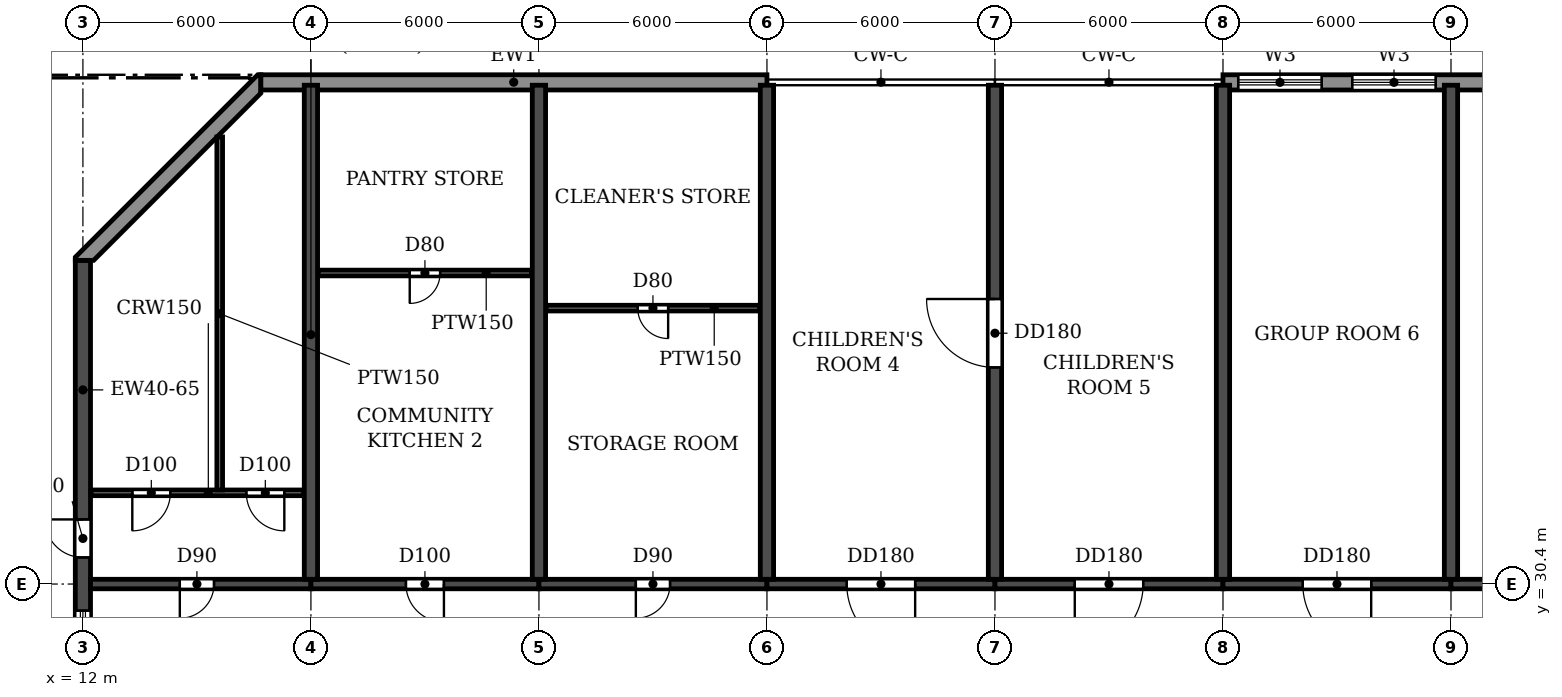
"""IFC4 building model, lengths in metres.
Left out: names, types, materials, properties, quantities, classifications, styles, units other than length and angle.
Written with IfcOpenShell. Run it as: python <this file> out.ifc"""

import sys

from ifc_helpers import new_model, si_unit, direction, frame, frame_2d, origin, place, context, subcontext, project, spatial, polyline, rectangle, outline, extrude, element, fill, save


model = new_model("IFC4")
c1 = context("Model", 3, precision=1e-05, world=origin(), true_north=direction((0.0, 1.0)))
c2 = subcontext(c1, "Body", "Model", "MODEL_VIEW")
j1 = project(units=[si_unit("LENGTHUNIT", "METRE"), si_unit("PLANEANGLEUNIT", "RADIAN")], contexts=[c1])
p1 = place(None, origin())
s1 = spatial("IfcSite", under=j1, at=p1, CompositionType="ELEMENT")
p2 = place(p1, origin())
s2 = spatial("IfcBuilding", under=s1, at=p2, CompositionType="ELEMENT")
p3 = place(p2, frame((0.0, 0.0, 105.9)))
s3 = spatial("IfcBuildingStorey", under=s2, at=p3, CompositionType="ELEMENT", Elevation=105.9)
for number, where, z_axis, x_axis in (
    (1, (18.0, 30.525, 0.0), (0.0, 0.0, 1.0), (0.0, 1.0, 0.0)),
    (2, (24.0, 30.525, 0.0), (0.0, 0.0, 1.0), (0.0, 1.0, 0.0)),
    (3, (30.0, 30.525, 0.0), (0.0, 0.0, 1.0), (0.0, 1.0, 0.0)),
):
    element("IfcWall", number, at=place(p3, frame(where, z_axis=z_axis, x_axis=x_axis)), inside=s3, PredefinedType="SHEAR", context=c2, shape_type="SweptSolid", body=[
        extrude(rectangle(XDim=13.0, YDim=0.35, at=frame_2d((6.5, 0.0))), origin(), (0.0, 0.0, 1.0), 3.06),
    ])
p4 = place(p3, frame((36.0, 30.525, 0.0), z_axis=(0.0, 0.0, 1.0), x_axis=(0.0, 1.0, 0.0)))
e4 = element("IfcWall", 4, at=p4, inside=s3, PredefinedType="SHEAR", context=c2, shape_type="SweptSolid", body=[
    extrude(rectangle(XDim=13.0, YDim=0.35, at=frame_2d((6.5, 0.0))), origin(), (0.0, 0.0, 1.0), 3.06),
])
p5 = place(p4, frame((5.575, 0.0, 0.0)))
e5 = element("IfcOpeningElement", 5, at=p5, cuts=e4, PredefinedType="OPENING", context=c2, shape_type="SweptSolid", body=[
    extrude(rectangle(XDim=1.8, YDim=2.1, at=frame_2d((0.9, 1.05))), frame((0.0, 0.185, 0.0), z_axis=(0.0, -1.0, 0.0), x_axis=(1.0, 0.0, 0.0)), (0.0, 0.0, 1.0), 0.37),
])
for number, where, z_axis, x_axis in (
    (6, (42.0, 30.525, 0.0), (0.0, 0.0, 1.0), (0.0, 1.0, 0.0)),
    (7, (48.0, 30.525, 0.0), (0.0, 0.0, 1.0), (0.0, 1.0, 0.0)),
):
    element("IfcWall", number, at=place(p3, frame(where, z_axis=z_axis, x_axis=x_axis)), inside=s3, PredefinedType="SHEAR", context=c2, shape_type="SweptSolid", body=[
        extrude(rectangle(XDim=13.0, YDim=0.35, at=frame_2d((6.5, 0.0))), origin(), (0.0, 0.0, 1.0), 3.06),
    ])
p6 = place(p3, frame((12.0, 4.683, 0.0), z_axis=(0.0, 0.0, 1.0), x_axis=(0.0, 1.0, 0.0)))
e8 = element("IfcWall", 8, at=p6, inside=s3, PredefinedType="SHEAR", context=c2, shape_type="SweptSolid", body=[
    extrude(rectangle(XDim=34.234, YDim=0.4, at=frame_2d((17.117, 0.0))), origin(), (0.0, 0.0, 1.0), 3.06),
])
p7 = place(p6, frame((23.817, 0.0, 0.9)))
e9 = element("IfcOpeningElement", 9, at=p7, cuts=e8, PredefinedType="OPENING", context=c2, shape_type="SweptSolid", body=[
    extrude(rectangle(XDim=1.2, YDim=1.5, at=frame_2d((0.6, 0.75))), frame((0.0, 0.21, 0.0), z_axis=(0.0, -1.0, 0.0), x_axis=(1.0, 0.0, 0.0)), (0.0, 0.0, 1.0), 0.42),
])
p8 = place(p6, frame((8.017, 0.0, 0.9)))
e10 = element("IfcOpeningElement", 10, at=p8, cuts=e8, PredefinedType="OPENING", context=c2, shape_type="SweptSolid", body=[
    extrude(rectangle(XDim=1.2, YDim=1.5, at=frame_2d((0.6, 0.75))), frame((0.0, 0.21, 0.0), z_axis=(0.0, -1.0, 0.0), x_axis=(1.0, 0.0, 0.0)), (0.0, 0.0, 1.0), 0.42),
])
p9 = place(p6, frame((15.917, 0.0, 0.9)))
e11 = element("IfcOpeningElement", 11, at=p9, cuts=e8, PredefinedType="OPENING", context=c2, shape_type="SweptSolid", body=[
    extrude(rectangle(XDim=1.2, YDim=1.5, at=frame_2d((0.6, 0.75))), frame((0.0, 0.21, 0.0), z_axis=(0.0, -1.0, 0.0), x_axis=(1.0, 0.0, 0.0)), (0.0, 0.0, 1.0), 0.42),
])
p10 = place(p6, frame((26.417, 0.0, 0.0)))
e12 = element("IfcOpeningElement", 12, at=p10, cuts=e8, PredefinedType="OPENING", context=c2, shape_type="SweptSolid", body=[
    extrude(rectangle(XDim=1.0, YDim=2.1, at=frame_2d((0.5, 1.05))), frame((0.0, 0.21, 0.0), z_axis=(0.0, -1.0, 0.0), x_axis=(1.0, 0.0, 0.0)), (0.0, 0.0, 1.0), 0.42),
])
p11 = place(p6, frame((3.159, 0.0, 0.0)))
e13 = element("IfcOpeningElement", 13, at=p11, cuts=e8, PredefinedType="OPENING", context=c2, shape_type="SweptSolid", body=[
    extrude(rectangle(XDim=1.0, YDim=2.1, at=frame_2d((0.5, 1.05))), frame((0.0, 0.21, 0.0), z_axis=(0.0, -1.0, 0.0), x_axis=(1.0, 0.0, 0.0)), (0.0, 0.0, 1.0), 0.42),
])
p12 = place(p3, frame((12.2, 30.4, 0.0), z_axis=(0.0, 0.0, 1.0), x_axis=(1.0, 0.0, 0.0)))
e14 = element("IfcWall", 14, at=p12, inside=s3, PredefinedType="SHEAR", context=c2, shape_type="SweptSolid", body=[
    extrude(rectangle(XDim=5.8, YDim=0.25, at=frame_2d((2.9, 0.0))), origin(), (0.0, 0.0, 1.0), 2.46),
])
p13 = place(p12, frame((2.35, 0.0, 0.0)))
e15 = element("IfcOpeningElement", 15, at=p13, cuts=e14, PredefinedType="OPENING", context=c2, shape_type="SweptSolid", body=[
    extrude(rectangle(XDim=0.9, YDim=2.1, at=frame_2d((0.45, 1.05))), frame((0.0, 0.135, 0.0), z_axis=(0.0, -1.0, 0.0), x_axis=(1.0, 0.0, 0.0)), (0.0, 0.0, 1.0), 0.27),
])
p14 = place(p3, frame((18.0, 30.4, 0.0), z_axis=(0.0, 0.0, 1.0), x_axis=(1.0, 0.0, 0.0)))
e16 = element("IfcWall", 16, at=p14, inside=s3, PredefinedType="SHEAR", context=c2, shape_type="SweptSolid", body=[
    extrude(rectangle(XDim=6.0, YDim=0.25, at=frame_2d((3.0, 0.0))), origin(), (0.0, 0.0, 1.0), 2.46),
])
p15 = place(p14, frame((2.5, 0.0, 0.0)))
e17 = element("IfcOpeningElement", 17, at=p15, cuts=e16, PredefinedType="OPENING", context=c2, shape_type="SweptSolid", body=[
    extrude(rectangle(XDim=1.0, YDim=2.1, at=frame_2d((0.5, 1.05))), frame((0.0, 0.135, 0.0), z_axis=(0.0, -1.0, 0.0), x_axis=(1.0, 0.0, 0.0)), (0.0, 0.0, 1.0), 0.27),
])
p16 = place(p3, frame((24.0, 30.4, 0.0), z_axis=(0.0, 0.0, 1.0), x_axis=(1.0, 0.0, 0.0)))
e18 = element("IfcWall", 18, at=p16, inside=s3, PredefinedType="SHEAR", context=c2, shape_type="SweptSolid", body=[
    extrude(rectangle(XDim=6.0, YDim=0.25, at=frame_2d((3.0, 0.0))), origin(), (0.0, 0.0, 1.0), 2.46),
])
p17 = place(p16, frame((2.55, 0.0, 0.0)))
e19 = element("IfcOpeningElement", 19, at=p17, cuts=e18, PredefinedType="OPENING", context=c2, shape_type="SweptSolid", body=[
    extrude(rectangle(XDim=0.9, YDim=2.1, at=frame_2d((0.45, 1.05))), frame((0.0, 0.135, 0.0), z_axis=(0.0, -1.0, 0.0), x_axis=(1.0, 0.0, 0.0)), (0.0, 0.0, 1.0), 0.27),
])
p18 = place(p3, frame((30.0, 30.4, 0.0), z_axis=(0.0, 0.0, 1.0), x_axis=(1.0, 0.0, 0.0)))
e20 = element("IfcWall", 20, at=p18, inside=s3, PredefinedType="SHEAR", context=c2, shape_type="SweptSolid", body=[
    extrude(rectangle(XDim=6.0, YDim=0.25, at=frame_2d((3.0, 0.0))), origin(), (0.0, 0.0, 1.0), 2.46),
])
p19 = place(p18, frame((2.1, 0.0, 0.0)))
e21 = element("IfcOpeningElement", 21, at=p19, cuts=e20, PredefinedType="OPENING", context=c2, shape_type="SweptSolid", body=[
    extrude(rectangle(XDim=1.8, YDim=2.1, at=frame_2d((0.9, 1.05))), frame((0.0, 0.135, 0.0), z_axis=(0.0, -1.0, 0.0), x_axis=(1.0, 0.0, 0.0)), (0.0, 0.0, 1.0), 0.27),
])
p20 = place(p3, frame((36.0, 30.4, 0.0), z_axis=(0.0, 0.0, 1.0), x_axis=(1.0, 0.0, 0.0)))
e22 = element("IfcWall", 22, at=p20, inside=s3, PredefinedType="SHEAR", context=c2, shape_type="SweptSolid", body=[
    extrude(rectangle(XDim=6.0, YDim=0.25, at=frame_2d((3.0, 0.0))), origin(), (0.0, 0.0, 1.0), 2.46),
])
p21 = place(p20, frame((2.1, 0.0, 0.0)))
e23 = element("IfcOpeningElement", 23, at=p21, cuts=e22, PredefinedType="OPENING", context=c2, shape_type="SweptSolid", body=[
    extrude(rectangle(XDim=1.8, YDim=2.1, at=frame_2d((0.9, 1.05))), frame((0.0, 0.135, 0.0), z_axis=(0.0, -1.0, 0.0), x_axis=(1.0, 0.0, 0.0)), (0.0, 0.0, 1.0), 0.27),
])
p22 = place(p3, frame((42.0, 30.4, 0.0), z_axis=(0.0, 0.0, 1.0), x_axis=(1.0, 0.0, 0.0)))
e24 = element("IfcWall", 24, at=p22, inside=s3, PredefinedType="SHEAR", context=c2, shape_type="SweptSolid", body=[
    extrude(rectangle(XDim=6.0, YDim=0.25, at=frame_2d((3.0, 0.0))), origin(), (0.0, 0.0, 1.0), 2.46),
])
p23 = place(p22, frame((2.1, 0.0, 0.0)))
e25 = element("IfcOpeningElement", 25, at=p23, cuts=e24, PredefinedType="OPENING", context=c2, shape_type="SweptSolid", body=[
    extrude(rectangle(XDim=1.8, YDim=2.1, at=frame_2d((0.9, 1.05))), frame((0.0, 0.135, 0.0), z_axis=(0.0, -1.0, 0.0), x_axis=(1.0, 0.0, 0.0)), (0.0, 0.0, 1.0), 0.27),
])
p24 = place(p3, frame((48.0, 30.4, 0.0), z_axis=(0.0, 0.0, 1.0), x_axis=(1.0, 0.0, 0.0)))
e26 = element("IfcWall", 26, at=p24, inside=s3, PredefinedType="SHEAR", context=c2, shape_type="SweptSolid", body=[
    extrude(rectangle(XDim=6.0, YDim=0.25, at=frame_2d((3.0, 0.0))), origin(), (0.0, 0.0, 1.0), 2.46),
])
p25 = place(p24, frame((2.1, 0.0, 0.0)))
e27 = element("IfcOpeningElement", 27, at=p25, cuts=e26, PredefinedType="OPENING", context=c2, shape_type="SweptSolid", body=[
    extrude(rectangle(XDim=1.8, YDim=2.1, at=frame_2d((0.9, 1.05))), frame((0.0, 0.135, 0.0), z_axis=(0.0, -1.0, 0.0), x_axis=(1.0, 0.0, 0.0)), (0.0, 0.0, 1.0), 0.27),
])
p26 = place(p3, frame((60.0, 43.6, 0.0), z_axis=(0.0, 0.0, 1.0), x_axis=(-1.0, 0.0, 0.0)))
e28 = element("IfcWall", 28, at=p26, inside=s3, PredefinedType="STANDARD", context=c2, shape_type="SweptSolid", body=[
    extrude(rectangle(XDim=18.0, YDim=0.4, at=frame_2d((9.0, 0.0))), origin(), (0.0, 0.0, 1.0), 3.06),
])
p27 = place(p26, frame((15.4, 0.0, 0.6)))
e29 = element("IfcOpeningElement", 29, at=p27, cuts=e28, PredefinedType="OPENING", context=c2, shape_type="SweptSolid", body=[
    extrude(rectangle(XDim=2.2, YDim=1.8, at=frame_2d((1.1, 0.9))), frame((0.0, 0.21, 0.0), z_axis=(0.0, -1.0, 0.0), x_axis=(1.0, 0.0, 0.0)), (0.0, 0.0, 1.0), 0.42),
])
p28 = place(p26, frame((12.4, 0.0, 0.6)))
e30 = element("IfcOpeningElement", 30, at=p28, cuts=e28, PredefinedType="OPENING", context=c2, shape_type="SweptSolid", body=[
    extrude(rectangle(XDim=2.2, YDim=1.8, at=frame_2d((1.1, 0.9))), frame((0.0, 0.21, 0.0), z_axis=(0.0, -1.0, 0.0), x_axis=(1.0, 0.0, 0.0)), (0.0, 0.0, 1.0), 0.42),
])
p29 = place(p26, frame((3.4, 0.0, 0.6)))
e31 = element("IfcOpeningElement", 31, at=p29, cuts=e28, PredefinedType="OPENING", context=c2, shape_type="SweptSolid", body=[
    extrude(rectangle(XDim=2.2, YDim=1.8, at=frame_2d((1.1, 0.9))), frame((0.0, 0.21, 0.0), z_axis=(0.0, -1.0, 0.0), x_axis=(1.0, 0.0, 0.0)), (0.0, 0.0, 1.0), 0.42),
])
p30 = place(p26, frame((0.4, 0.0, 0.6)))
e32 = element("IfcOpeningElement", 32, at=p30, cuts=e28, PredefinedType="OPENING", context=c2, shape_type="SweptSolid", body=[
    extrude(rectangle(XDim=2.2, YDim=1.8, at=frame_2d((1.1, 0.9))), frame((0.0, 0.21, 0.0), z_axis=(0.0, -1.0, 0.0), x_axis=(1.0, 0.0, 0.0)), (0.0, 0.0, 1.0), 0.42),
])
p31 = place(p3, frame((30.0, 43.6, 0.0), z_axis=(0.0, 0.0, 1.0), x_axis=(-1.0, 0.0, 0.0)))
e33 = element("IfcWall", 33, at=p31, inside=s3, PredefinedType="STANDARD", context=c2, shape_type="SweptSolid", body=[
    extrude(rectangle(XDim=13.317, YDim=0.4, at=frame_2d((6.659, 0.0))), origin(), (0.0, 0.0, 1.0), 3.06),
])
p32 = place(p3, origin())
e34 = element("IfcWall", 34, at=p32, inside=s3, PredefinedType="STANDARD", context=c2, shape_type="SweptSolid", body=[
    extrude(outline(polyline([(16.683, 43.8), (16.6, 43.8), (11.8, 39.0), (11.8, 38.917), (12.283, 38.917), (16.683, 43.317), (16.683, 43.8)])), origin(), (0.0, 0.0, 1.0), 3.06),
])
p33 = place(p3, frame((12.21, 32.8, 0.0), z_axis=(0.0, 0.0, 1.0), x_axis=(1.0, 0.0, 0.0)))
e35 = element("IfcWall", 35, at=p33, inside=s3, PredefinedType="PARTITIONING", context=c2, shape_type="SweptSolid", body=[
    extrude(rectangle(XDim=5.605, YDim=0.15, at=frame_2d((2.802, 0.0))), origin(), (0.0, 0.0, 1.0), 3.06),
])
p34 = place(p33, frame((1.09, 0.0, 0.0)))
e36 = element("IfcOpeningElement", 36, at=p34, cuts=e35, PredefinedType="OPENING", context=c2, shape_type="SweptSolid", body=[
    extrude(rectangle(XDim=1.0, YDim=2.1, at=frame_2d((0.5, 1.05))), frame((0.0, 0.085, 0.0), z_axis=(0.0, -1.0, 0.0), x_axis=(1.0, 0.0, 0.0)), (0.0, 0.0, 1.0), 0.17),
])
p35 = place(p33, frame((4.09, 0.0, 0.0)))
e37 = element("IfcOpeningElement", 37, at=p35, cuts=e35, PredefinedType="OPENING", context=c2, shape_type="SweptSolid", body=[
    extrude(rectangle(XDim=1.0, YDim=2.1, at=frame_2d((0.5, 1.05))), frame((0.0, 0.085, 0.0), z_axis=(0.0, -1.0, 0.0), x_axis=(1.0, 0.0, 0.0)), (0.0, 0.0, 1.0), 0.17),
])
p36 = place(p3, frame((24.185, 37.66, 0.0), z_axis=(0.0, 0.0, 1.0), x_axis=(1.0, 0.0, 0.0)))
e38 = element("IfcWall", 38, at=p36, inside=s3, PredefinedType="PARTITIONING", context=c2, shape_type="SweptSolid", body=[
    extrude(rectangle(XDim=5.63, YDim=0.15, at=frame_2d((2.815, 0.0))), origin(), (0.0, 0.0, 1.0), 3.06),
])
p37 = place(p36, frame((2.415, 0.0, 0.0)))
e39 = element("IfcOpeningElement", 39, at=p37, cuts=e38, PredefinedType="OPENING", context=c2, shape_type="SweptSolid", body=[
    extrude(rectangle(XDim=0.8, YDim=2.1, at=frame_2d((0.4, 1.05))), frame((0.0, 0.085, 0.0), z_axis=(0.0, -1.0, 0.0), x_axis=(1.0, 0.0, 0.0)), (0.0, 0.0, 1.0), 0.17),
])
p38 = place(p3, frame((18.185, 38.584, 0.0), z_axis=(0.0, 0.0, 1.0), x_axis=(1.0, 0.0, 0.0)))
e40 = element("IfcWall", 40, at=p38, inside=s3, PredefinedType="PARTITIONING", context=c2, shape_type="SweptSolid", body=[
    extrude(rectangle(XDim=5.63, YDim=0.15, at=frame_2d((2.815, 0.0))), origin(), (0.0, 0.0, 1.0), 3.06),
])
p39 = place(p38, frame((2.415, 0.0, 0.0)))
e41 = element("IfcOpeningElement", 41, at=p39, cuts=e40, PredefinedType="OPENING", context=c2, shape_type="SweptSolid", body=[
    extrude(rectangle(XDim=0.8, YDim=2.1, at=frame_2d((0.4, 1.05))), frame((0.0, 0.085, 0.0), z_axis=(0.0, -1.0, 0.0), x_axis=(1.0, 0.0, 0.0)), (0.0, 0.0, 1.0), 0.17),
])
p40 = place(p3, frame((15.6, 32.875, 0.0), z_axis=(0.0, 0.0, 1.0), x_axis=(0.0, 1.0, 0.0)))
e42 = element("IfcWall", 42, at=p40, inside=s3, PredefinedType="PARTITIONING", context=c2, shape_type="SweptSolid", body=[
    extrude(rectangle(XDim=9.289, YDim=0.15, at=frame_2d((4.644, 0.0))), origin(), (0.0, 0.0, 1.0), 3.06),
])
p41 = place(p27, origin())
e43 = element("IfcWindow", 43, at=p41, inside=s3, PartitioningType="DOUBLE_PANEL_HORIZONTAL", PredefinedType="WINDOW", context=c2, shape_type="SweptSolid", body=[
    extrude(rectangle(XDim=2.2, YDim=1.8, at=frame_2d((1.1, 0.9))), frame((0.0, 0.03, 0.0), z_axis=(0.0, -1.0, 0.0), x_axis=(1.0, 0.0, 0.0)), (0.0, 0.0, 1.0), 0.06),
])
fill(e29, e43)
p42 = place(p28, origin())
e44 = element("IfcWindow", 44, at=p42, inside=s3, PartitioningType="DOUBLE_PANEL_HORIZONTAL", PredefinedType="WINDOW", context=c2, shape_type="SweptSolid", body=[
    extrude(rectangle(XDim=2.2, YDim=1.8, at=frame_2d((1.1, 0.9))), frame((0.0, 0.03, 0.0), z_axis=(0.0, -1.0, 0.0), x_axis=(1.0, 0.0, 0.0)), (0.0, 0.0, 1.0), 0.06),
])
fill(e30, e44)
p43 = place(p7, origin())
e45 = element("IfcWindow", 45, at=p43, inside=s3, PartitioningType="SINGLE_PANEL", PredefinedType="WINDOW", context=c2, shape_type="SweptSolid", body=[
    extrude(rectangle(XDim=1.2, YDim=1.5, at=frame_2d((0.6, 0.75))), frame((0.0, 0.03, 0.0), z_axis=(0.0, -1.0, 0.0), x_axis=(1.0, 0.0, 0.0)), (0.0, 0.0, 1.0), 0.06),
])
fill(e9, e45)
p44 = place(p13, frame((0.9, 0.0, 0.0), z_axis=(0.0, 0.0, 1.0), x_axis=(-1.0, 0.0, 0.0)))
e46 = element("IfcDoor", 46, at=p44, inside=s3, OperationType="SINGLE_SWING_RIGHT", PredefinedType="DOOR", context=c2, shape_type="SweptSolid", body=[
    extrude(rectangle(XDim=0.9, YDim=2.1, at=frame_2d((0.45, 1.05))), frame((0.0, 0.025, 0.0), z_axis=(0.0, -1.0, 0.0), x_axis=(1.0, 0.0, 0.0)), (0.0, 0.0, 1.0), 0.05),
])
fill(e15, e46)
p45 = place(p15, frame((1.0, 0.0, 0.0), z_axis=(0.0, 0.0, 1.0), x_axis=(-1.0, 0.0, 0.0)))
e47 = element("IfcDoor", 47, at=p45, inside=s3, OperationType="SINGLE_SWING_LEFT", PredefinedType="DOOR", context=c2, shape_type="SweptSolid", body=[
    extrude(rectangle(XDim=1.0, YDim=2.1, at=frame_2d((0.5, 1.05))), frame((0.0, 0.025, 0.0), z_axis=(0.0, -1.0, 0.0), x_axis=(1.0, 0.0, 0.0)), (0.0, 0.0, 1.0), 0.05),
])
fill(e17, e47)
p46 = place(p17, frame((0.9, 0.0, 0.0), z_axis=(0.0, 0.0, 1.0), x_axis=(-1.0, 0.0, 0.0)))
e48 = element("IfcDoor", 48, at=p46, inside=s3, OperationType="SINGLE_SWING_RIGHT", PredefinedType="DOOR", context=c2, shape_type="SweptSolid", body=[
    extrude(rectangle(XDim=0.9, YDim=2.1, at=frame_2d((0.45, 1.05))), frame((0.0, 0.025, 0.0), z_axis=(0.0, -1.0, 0.0), x_axis=(1.0, 0.0, 0.0)), (0.0, 0.0, 1.0), 0.05),
])
fill(e19, e48)
p47 = place(p19, frame((1.8, 0.0, 0.0), z_axis=(0.0, 0.0, 1.0), x_axis=(-1.0, 0.0, 0.0)))
e49 = element("IfcDoor", 49, at=p47, inside=s3, OperationType="DOUBLE_DOOR_SINGLE_SWING", PredefinedType="DOOR", context=c2, shape_type="SweptSolid", body=[
    extrude(rectangle(XDim=1.8, YDim=2.1, at=frame_2d((0.9, 1.05))), frame((0.0, 0.025, 0.0), z_axis=(0.0, -1.0, 0.0), x_axis=(1.0, 0.0, 0.0)), (0.0, 0.0, 1.0), 0.05),
])
fill(e21, e49)
p48 = place(p21, frame((1.8, 0.0, 0.0), z_axis=(0.0, 0.0, 1.0), x_axis=(-1.0, 0.0, 0.0)))
e50 = element("IfcDoor", 50, at=p48, inside=s3, OperationType="DOUBLE_DOOR_SINGLE_SWING", PredefinedType="DOOR", context=c2, shape_type="SweptSolid", body=[
    extrude(rectangle(XDim=1.8, YDim=2.1, at=frame_2d((0.9, 1.05))), frame((0.0, 0.025, 0.0), z_axis=(0.0, -1.0, 0.0), x_axis=(1.0, 0.0, 0.0)), (0.0, 0.0, 1.0), 0.05),
])
fill(e23, e50)
p49 = place(p23, frame((1.8, 0.0, 0.0), z_axis=(0.0, 0.0, 1.0), x_axis=(-1.0, 0.0, 0.0)))
e51 = element("IfcDoor", 51, at=p49, inside=s3, OperationType="DOUBLE_DOOR_SINGLE_SWING", PredefinedType="DOOR", context=c2, shape_type="SweptSolid", body=[
    extrude(rectangle(XDim=1.8, YDim=2.1, at=frame_2d((0.9, 1.05))), frame((0.0, 0.025, 0.0), z_axis=(0.0, -1.0, 0.0), x_axis=(1.0, 0.0, 0.0)), (0.0, 0.0, 1.0), 0.05),
])
fill(e25, e51)
p50 = place(p10, origin())
e52 = element("IfcDoor", 52, at=p50, inside=s3, OperationType="SINGLE_SWING_RIGHT", PredefinedType="DOOR", context=c2, shape_type="SweptSolid", body=[
    extrude(rectangle(XDim=1.0, YDim=2.1, at=frame_2d((0.5, 1.05))), frame((0.0, 0.025, 0.0), z_axis=(0.0, -1.0, 0.0), x_axis=(1.0, 0.0, 0.0)), (0.0, 0.0, 1.0), 0.05),
])
fill(e12, e52)
p51 = place(p34, frame((1.0, 0.0, 0.0), z_axis=(0.0, 0.0, 1.0), x_axis=(-1.0, 0.0, 0.0)))
e53 = element("IfcDoor", 53, at=p51, inside=s3, OperationType="SINGLE_SWING_RIGHT", PredefinedType="DOOR", context=c2, shape_type="SweptSolid", body=[
    extrude(rectangle(XDim=1.0, YDim=2.1, at=frame_2d((0.5, 1.05))), frame((0.0, 0.025, 0.0), z_axis=(0.0, -1.0, 0.0), x_axis=(1.0, 0.0, 0.0)), (0.0, 0.0, 1.0), 0.05),
])
fill(e36, e53)
p52 = place(p35, frame((1.0, 0.0, 0.0), z_axis=(0.0, 0.0, 1.0), x_axis=(-1.0, 0.0, 0.0)))
e54 = element("IfcDoor", 54, at=p52, inside=s3, OperationType="SINGLE_SWING_LEFT", PredefinedType="DOOR", context=c2, shape_type="SweptSolid", body=[
    extrude(rectangle(XDim=1.0, YDim=2.1, at=frame_2d((0.5, 1.05))), frame((0.0, 0.025, 0.0), z_axis=(0.0, -1.0, 0.0), x_axis=(1.0, 0.0, 0.0)), (0.0, 0.0, 1.0), 0.05),
])
fill(e37, e54)
p53 = place(p39, frame((0.8, 0.0, 0.0), z_axis=(0.0, 0.0, 1.0), x_axis=(-1.0, 0.0, 0.0)))
e55 = element("IfcDoor", 55, at=p53, inside=s3, OperationType="SINGLE_SWING_RIGHT", PredefinedType="DOOR", context=c2, shape_type="SweptSolid", body=[
    extrude(rectangle(XDim=0.8, YDim=2.1, at=frame_2d((0.4, 1.05))), frame((0.0, 0.025, 0.0), z_axis=(0.0, -1.0, 0.0), x_axis=(1.0, 0.0, 0.0)), (0.0, 0.0, 1.0), 0.05),
])
fill(e41, e55)
p54 = place(p37, frame((0.8, 0.0, 0.0), z_axis=(0.0, 0.0, 1.0), x_axis=(-1.0, 0.0, 0.0)))
e56 = element("IfcDoor", 56, at=p54, inside=s3, OperationType="SINGLE_SWING_LEFT", PredefinedType="DOOR", context=c2, shape_type="SweptSolid", body=[
    extrude(rectangle(XDim=0.8, YDim=2.1, at=frame_2d((0.4, 1.05))), frame((0.0, 0.025, 0.0), z_axis=(0.0, -1.0, 0.0), x_axis=(1.0, 0.0, 0.0)), (0.0, 0.0, 1.0), 0.05),
])
fill(e39, e56)
p55 = place(p5, origin())
e57 = element("IfcDoor", 57, at=p55, inside=s3, OperationType="DOUBLE_DOOR_SINGLE_SWING", PredefinedType="DOOR", context=c2, shape_type="SweptSolid", body=[
    extrude(rectangle(XDim=1.8, YDim=2.1, at=frame_2d((0.9, 1.05))), frame((0.0, 0.025, 0.0), z_axis=(0.0, -1.0, 0.0), x_axis=(1.0, 0.0, 0.0)), (0.0, 0.0, 1.0), 0.05),
])
fill(e5, e57)
save(model, sys.argv[1])
